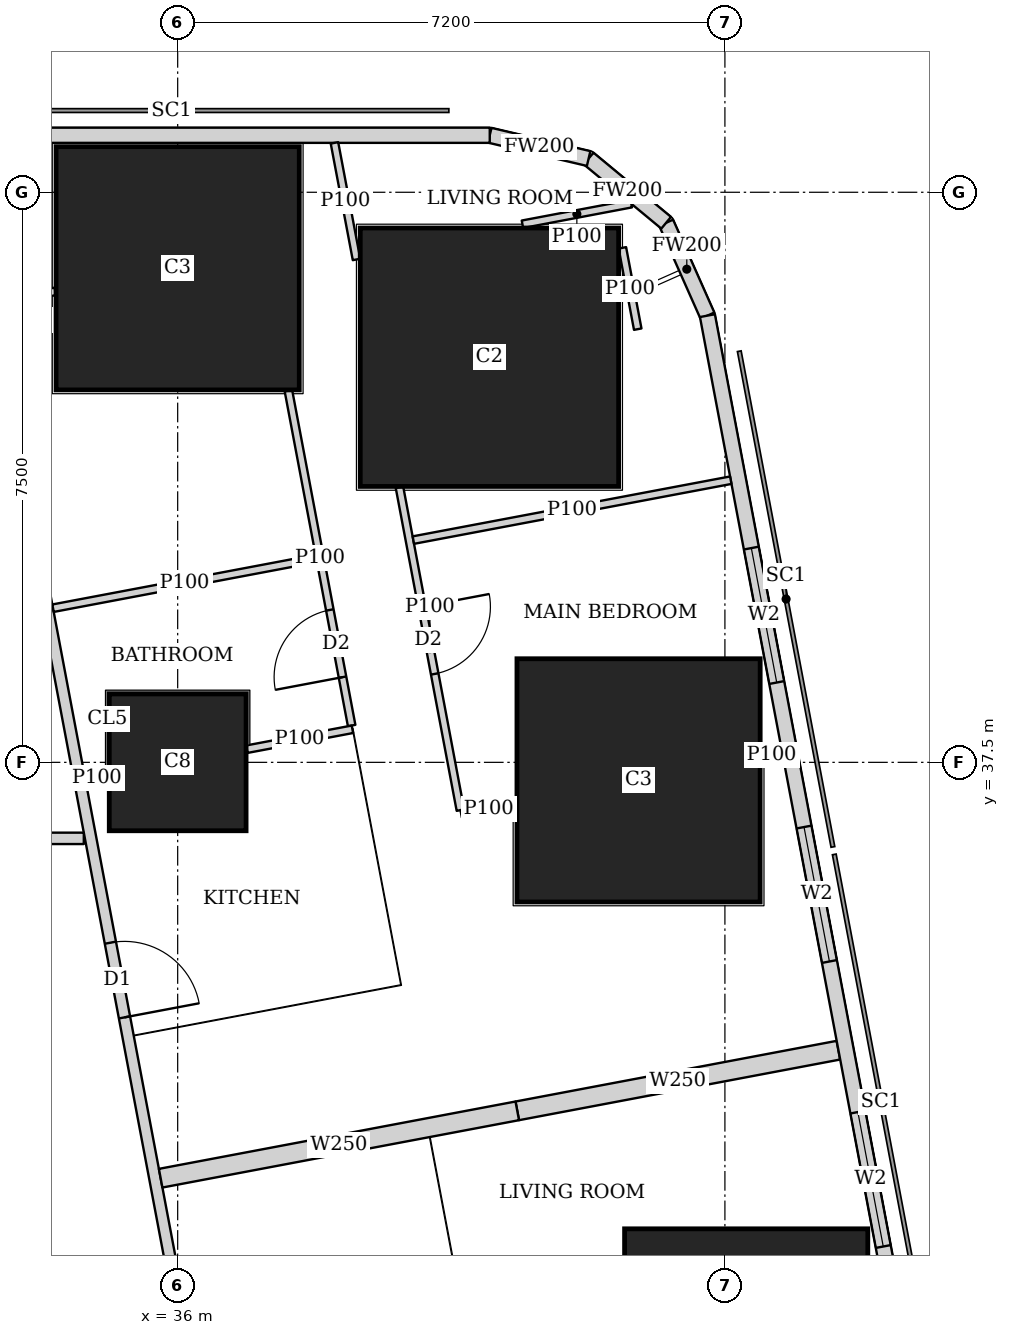
"""IFC4 building model, lengths in metres.
Left out: names, types, materials, properties, quantities, classifications, styles, units other than length and angle.
Written with IfcOpenShell. Run it as: python <this file> out.ifc"""

import sys

from ifc_helpers import new_model, si_unit, direction, frame, frame_2d, origin, origin_2d, place, context, subcontext, project, spatial, rectangle, extrude, element, fill, save


model = new_model("IFC4")
c1 = context("Model", 3, precision=1e-05, world=origin(), true_north=direction((0.0, 1.0)))
c2 = subcontext(c1, "Body", "Model", "MODEL_VIEW")
j1 = project(units=[si_unit("LENGTHUNIT", "METRE"), si_unit("PLANEANGLEUNIT", "RADIAN")], contexts=[c1])
p1 = place(None, origin())
s1 = spatial("IfcSite", under=j1, at=p1, CompositionType="ELEMENT")
p2 = place(p1, origin())
s2 = spatial("IfcBuilding", under=s1, at=p2, CompositionType="ELEMENT")
p3 = place(p2, frame((0.0, 0.0, 20.0)))
s3 = spatial("IfcBuildingStorey", under=s2, at=p3, CompositionType="ELEMENT", Elevation=20.0)
p4 = place(p3, frame((43.48, 29.763, 0.0), z_axis=(0.0, 0.0, 1.0), x_axis=(1.0, 0.0, 0.0)))
e1 = element("IfcColumn", 1, at=p4, inside=s3, PredefinedType="COLUMN", context=c2, shape_type="SweptSolid", body=[
    extrude(rectangle(XDim=3.2, YDim=3.2, at=origin_2d()), origin(), (0.0, 0.0, 1.0), 3.75),
])
p5 = place(p3, frame((36.0, 37.5, 0.0), z_axis=(0.0, 0.0, 1.0), x_axis=(1.0, 0.0, 0.0)))
e2 = element("IfcColumn", 2, at=p5, inside=s3, PredefinedType="COLUMN", context=c2, shape_type="SweptSolid", body=[
    extrude(rectangle(XDim=1.8, YDim=1.8, at=origin_2d()), origin(), (0.0, 0.0, 1.0), 3.75),
])
p6 = place(p3, frame((42.064, 37.263, -0.3), z_axis=(0.0, 0.0, 1.0), x_axis=(1.0, 0.0, 0.0)))
e3 = element("IfcColumn", 3, at=p6, inside=s3, PredefinedType="COLUMN", context=c2, shape_type="SweptSolid", body=[
    extrude(rectangle(XDim=3.2, YDim=3.2, at=origin_2d()), origin(), (0.0, 0.0, 1.0), 4.05),
])
p7 = place(p3, frame((40.102, 42.83, 0.0), z_axis=(0.0, 0.0, 1.0), x_axis=(1.0, 0.0, 0.0)))
e4 = element("IfcColumn", 4, at=p7, inside=s3, PredefinedType="COLUMN", context=c2, shape_type="SweptSolid", body=[
    extrude(rectangle(XDim=3.4, YDim=3.4, at=origin_2d()), origin(), (0.0, 0.0, 1.0), 3.75),
])
p8 = place(p3, frame((36.0, 44.0, -0.3), z_axis=(0.0, 0.0, 1.0), x_axis=(1.0, 0.0, 0.0)))
e5 = element("IfcColumn", 5, at=p8, inside=s3, PredefinedType="COLUMN", context=c2, shape_type="SweptSolid", body=[
    extrude(rectangle(XDim=3.2, YDim=3.2, at=origin_2d()), origin(), (0.0, 0.0, 1.0), 4.05),
])
p9 = place(p3, frame((50.653, 2.703, 0.0), z_axis=(0.0, 0.0, 1.0), x_axis=(-0.185612026696, 0.982623109613, 0.0)))
e6 = element("IfcWall", 6, at=p9, inside=s3, PredefinedType="SOLIDWALL", context=c2, shape_type="SweptSolid", body=[
    extrude(rectangle(XDim=41.393, YDim=0.2, at=frame_2d((20.697, 0.0))), origin(), (0.0, 0.0, 1.0), 3.5),
])
p10 = place(p9, frame((1.633, 0.0, 0.9)))
e7 = element("IfcOpeningElement", 7, at=p10, cuts=e6, PredefinedType="OPENING", context=c2, shape_type="SweptSolid", body=[
    extrude(rectangle(XDim=1.8, YDim=1.5, at=frame_2d((0.9, 0.75))), frame((0.0, 0.11, 0.0), z_axis=(0.0, -1.0, 0.0), x_axis=(1.0, 0.0, 0.0)), (0.0, 0.0, 1.0), 0.22),
])
p11 = place(p9, frame((6.032, 0.0, 0.9)))
e8 = element("IfcOpeningElement", 8, at=p11, cuts=e6, PredefinedType="OPENING", context=c2, shape_type="SweptSolid", body=[
    extrude(rectangle(XDim=1.8, YDim=1.5, at=frame_2d((0.9, 0.75))), frame((0.0, 0.11, 0.0), z_axis=(0.0, -1.0, 0.0), x_axis=(1.0, 0.0, 0.0)), (0.0, 0.0, 1.0), 0.22),
])
p12 = place(p9, frame((9.848, 0.0, 0.9)))
e9 = element("IfcOpeningElement", 9, at=p12, cuts=e6, PredefinedType="OPENING", context=c2, shape_type="SweptSolid", body=[
    extrude(rectangle(XDim=1.8, YDim=1.5, at=frame_2d((0.9, 0.75))), frame((0.0, 0.11, 0.0), z_axis=(0.0, -1.0, 0.0), x_axis=(1.0, 0.0, 0.0)), (0.0, 0.0, 1.0), 0.22),
])
p13 = place(p9, frame((17.481, 0.0, 0.9)))
e10 = element("IfcOpeningElement", 10, at=p13, cuts=e6, PredefinedType="OPENING", context=c2, shape_type="SweptSolid", body=[
    extrude(rectangle(XDim=1.8, YDim=1.5, at=frame_2d((0.9, 0.75))), frame((0.0, 0.11, 0.0), z_axis=(0.0, -1.0, 0.0), x_axis=(1.0, 0.0, 0.0)), (0.0, 0.0, 1.0), 0.22),
])
p14 = place(p9, frame((21.297, 0.0, 0.9)))
e11 = element("IfcOpeningElement", 11, at=p14, cuts=e6, PredefinedType="OPENING", context=c2, shape_type="SweptSolid", body=[
    extrude(rectangle(XDim=1.8, YDim=1.5, at=frame_2d((0.9, 0.75))), frame((0.0, 0.11, 0.0), z_axis=(0.0, -1.0, 0.0), x_axis=(1.0, 0.0, 0.0)), (0.0, 0.0, 1.0), 0.22),
])
p15 = place(p9, frame((25.113, 0.0, 0.9)))
e12 = element("IfcOpeningElement", 12, at=p15, cuts=e6, PredefinedType="OPENING", context=c2, shape_type="SweptSolid", body=[
    extrude(rectangle(XDim=1.8, YDim=1.5, at=frame_2d((0.9, 0.75))), frame((0.0, 0.11, 0.0), z_axis=(0.0, -1.0, 0.0), x_axis=(1.0, 0.0, 0.0)), (0.0, 0.0, 1.0), 0.22),
])
p16 = place(p9, frame((28.93, 0.0, 0.9)))
e13 = element("IfcOpeningElement", 13, at=p16, cuts=e6, PredefinedType="OPENING", context=c2, shape_type="SweptSolid", body=[
    extrude(rectangle(XDim=1.8, YDim=1.5, at=frame_2d((0.9, 0.75))), frame((0.0, 0.11, 0.0), z_axis=(0.0, -1.0, 0.0), x_axis=(1.0, 0.0, 0.0)), (0.0, 0.0, 1.0), 0.22),
])
p17 = place(p9, frame((32.746, 0.0, 0.9)))
e14 = element("IfcOpeningElement", 14, at=p17, cuts=e6, PredefinedType="OPENING", context=c2, shape_type="SweptSolid", body=[
    extrude(rectangle(XDim=1.8, YDim=1.5, at=frame_2d((0.9, 0.75))), frame((0.0, 0.11, 0.0), z_axis=(0.0, -1.0, 0.0), x_axis=(1.0, 0.0, 0.0)), (0.0, 0.0, 1.0), 0.22),
])
p18 = place(p9, frame((36.481, 0.0, 0.9)))
e15 = element("IfcOpeningElement", 15, at=p18, cuts=e6, PredefinedType="OPENING", context=c2, shape_type="SweptSolid", body=[
    extrude(rectangle(XDim=1.8, YDim=1.5, at=frame_2d((0.9, 0.75))), frame((0.0, 0.11, 0.0), z_axis=(0.0, -1.0, 0.0), x_axis=(1.0, 0.0, 0.0)), (0.0, 0.0, 1.0), 0.22),
])
p19 = place(p3, frame((42.97, 43.377, 0.0), z_axis=(0.0, 0.0, 1.0), x_axis=(-0.406002956633, 0.913871762998, 0.0)))
e16 = element("IfcWall", 16, at=p19, inside=s3, PredefinedType="SOLIDWALL", context=c2, shape_type="SweptSolid", body=[
    extrude(rectangle(XDim=1.337, YDim=0.2, at=frame_2d((0.669, 0.0))), origin(), (0.0, 0.0, 1.0), 3.5),
])
p20 = place(p3, frame((42.427, 44.599, 0.0), z_axis=(0.0, 0.0, 1.0), x_axis=(-0.770091412544, 0.637933551655, 0.0)))
e17 = element("IfcWall", 17, at=p20, inside=s3, PredefinedType="SOLIDWALL", context=c2, shape_type="SweptSolid", body=[
    extrude(rectangle(XDim=1.324, YDim=0.2, at=frame_2d((0.662, 0.0))), origin(), (0.0, 0.0, 1.0), 3.5),
])
p21 = place(p3, frame((41.407, 45.444, 0.0), z_axis=(0.0, 0.0, 1.0), x_axis=(-0.973453091607, 0.228886606077, 0.0)))
e18 = element("IfcWall", 18, at=p21, inside=s3, PredefinedType="SOLIDWALL", context=c2, shape_type="SweptSolid", body=[
    extrude(rectangle(XDim=1.336, YDim=0.2, at=frame_2d((0.668, 0.0))), origin(), (0.0, 0.0, 1.0), 3.5),
])
p22 = place(p3, frame((40.106, 45.75, 0.0), z_axis=(0.0, 0.0, 1.0), x_axis=(-1.0, 0.0, 0.0)))
e19 = element("IfcWall", 19, at=p22, inside=s3, PredefinedType="SOLIDWALL", context=c2, shape_type="SweptSolid", body=[
    extrude(rectangle(XDim=37.943, YDim=0.2, at=frame_2d((18.971, 0.0))), origin(), (0.0, 0.0, 1.0), 3.5),
])
p23 = place(p22, frame((8.606, 0.0, 0.9)))
e20 = element("IfcOpeningElement", 20, at=p23, cuts=e19, PredefinedType="OPENING", context=c2, shape_type="SweptSolid", body=[
    extrude(rectangle(XDim=1.8, YDim=1.5, at=frame_2d((0.9, 0.75))), frame((0.0, 0.11, 0.0), z_axis=(0.0, -1.0, 0.0), x_axis=(1.0, 0.0, 0.0)), (0.0, 0.0, 1.0), 0.22),
])
p24 = place(p22, frame((12.206, 0.0, 0.9)))
e21 = element("IfcOpeningElement", 21, at=p24, cuts=e19, PredefinedType="OPENING", context=c2, shape_type="SweptSolid", body=[
    extrude(rectangle(XDim=1.8, YDim=1.5, at=frame_2d((0.9, 0.75))), frame((0.0, 0.11, 0.0), z_axis=(0.0, -1.0, 0.0), x_axis=(1.0, 0.0, 0.0)), (0.0, 0.0, 1.0), 0.22),
])
p25 = place(p22, frame((15.806, 0.0, 0.9)))
e22 = element("IfcOpeningElement", 22, at=p25, cuts=e19, PredefinedType="OPENING", context=c2, shape_type="SweptSolid", body=[
    extrude(rectangle(XDim=1.8, YDim=1.5, at=frame_2d((0.9, 0.75))), frame((0.0, 0.11, 0.0), z_axis=(0.0, -1.0, 0.0), x_axis=(1.0, 0.0, 0.0)), (0.0, 0.0, 1.0), 0.22),
])
p26 = place(p22, frame((19.406, 0.0, 0.9)))
e23 = element("IfcOpeningElement", 23, at=p26, cuts=e19, PredefinedType="OPENING", context=c2, shape_type="SweptSolid", body=[
    extrude(rectangle(XDim=1.8, YDim=1.5, at=frame_2d((0.9, 0.75))), frame((0.0, 0.11, 0.0), z_axis=(0.0, -1.0, 0.0), x_axis=(1.0, 0.0, 0.0)), (0.0, 0.0, 1.0), 0.22),
])
p27 = place(p22, frame((23.006, 0.0, 0.9)))
e24 = element("IfcOpeningElement", 24, at=p27, cuts=e19, PredefinedType="OPENING", context=c2, shape_type="SweptSolid", body=[
    extrude(rectangle(XDim=1.8, YDim=1.5, at=frame_2d((0.9, 0.75))), frame((0.0, 0.11, 0.0), z_axis=(0.0, -1.0, 0.0), x_axis=(1.0, 0.0, 0.0)), (0.0, 0.0, 1.0), 0.22),
])
p28 = place(p22, frame((26.606, 0.0, 0.9)))
e25 = element("IfcOpeningElement", 25, at=p28, cuts=e19, PredefinedType="OPENING", context=c2, shape_type="SweptSolid", body=[
    extrude(rectangle(XDim=1.8, YDim=1.5, at=frame_2d((0.9, 0.75))), frame((0.0, 0.11, 0.0), z_axis=(0.0, -1.0, 0.0), x_axis=(1.0, 0.0, 0.0)), (0.0, 0.0, 1.0), 0.22),
])
p29 = place(p3, frame((8.35, 36.5, 0.0), z_axis=(0.0, 0.0, 1.0), x_axis=(1.0, 0.0, 0.0)))
e26 = element("IfcWall", 26, at=p29, inside=s3, PredefinedType="SOLIDWALL", context=c2, shape_type="SweptSolid", body=[
    extrude(rectangle(XDim=26.415, YDim=0.15, at=frame_2d((13.208, 0.0))), origin(), (0.0, 0.0, 1.0), 3.5),
])
p30 = place(p29, frame((3.383, 0.0, 0.0)))
e27 = element("IfcOpeningElement", 27, at=p30, cuts=e26, PredefinedType="OPENING", context=c2, shape_type="SweptSolid", body=[
    extrude(rectangle(XDim=1.0, YDim=2.1, at=frame_2d((0.5, 1.05))), frame((0.0, 0.085, 0.0), z_axis=(0.0, -1.0, 0.0), x_axis=(1.0, 0.0, 0.0)), (0.0, 0.0, 1.0), 0.17),
])
p31 = place(p29, frame((7.65, 0.0, 0.0)))
e28 = element("IfcOpeningElement", 28, at=p31, cuts=e26, PredefinedType="OPENING", context=c2, shape_type="SweptSolid", body=[
    extrude(rectangle(XDim=1.0, YDim=2.1, at=frame_2d((0.5, 1.05))), frame((0.0, 0.085, 0.0), z_axis=(0.0, -1.0, 0.0), x_axis=(1.0, 0.0, 0.0)), (0.0, 0.0, 1.0), 0.17),
])
p32 = place(p29, frame((14.857, 0.0, 0.0)))
e29 = element("IfcOpeningElement", 29, at=p32, cuts=e26, PredefinedType="OPENING", context=c2, shape_type="SweptSolid", body=[
    extrude(rectangle(XDim=1.0, YDim=2.1, at=frame_2d((0.5, 1.05))), frame((0.0, 0.085, 0.0), z_axis=(0.0, -1.0, 0.0), x_axis=(1.0, 0.0, 0.0)), (0.0, 0.0, 1.0), 0.17),
])
p33 = place(p3, frame((33.755, 42.325, 0.0), z_axis=(0.0, 0.0, 1.0), x_axis=(0.185611461091, -0.982623216453, 0.0)))
e30 = element("IfcWall", 30, at=p33, inside=s3, PredefinedType="SOLIDWALL", context=c2, shape_type="SweptSolid", body=[
    extrude(rectangle(XDim=40.241, YDim=0.15, at=frame_2d((20.121, 0.0))), origin(), (0.0, 0.0, 1.0), 2.5),
])
p34 = place(p33, frame((7.325, 0.0, 0.0)))
e31 = element("IfcOpeningElement", 31, at=p34, cuts=e30, PredefinedType="OPENING", context=c2, shape_type="SweptSolid", body=[
    extrude(rectangle(XDim=1.0, YDim=2.1, at=frame_2d((0.5, 1.05))), frame((0.0, 0.085, 0.0), z_axis=(0.0, -1.0, 0.0), x_axis=(1.0, 0.0, 0.0)), (0.0, 0.0, 1.0), 0.17),
])
p35 = place(p33, frame((11.902, 0.0, 0.0)))
e32 = element("IfcOpeningElement", 32, at=p35, cuts=e30, PredefinedType="OPENING", context=c2, shape_type="SweptSolid", body=[
    extrude(rectangle(XDim=1.0, YDim=2.1, at=frame_2d((0.5, 1.05))), frame((0.0, 0.085, 0.0), z_axis=(0.0, -1.0, 0.0), x_axis=(1.0, 0.0, 0.0)), (0.0, 0.0, 1.0), 0.17),
])
p36 = place(p33, frame((25.718, 0.0, 0.0)))
e33 = element("IfcOpeningElement", 33, at=p36, cuts=e30, PredefinedType="OPENING", context=c2, shape_type="SweptSolid", body=[
    extrude(rectangle(XDim=1.0, YDim=2.1, at=frame_2d((0.5, 1.05))), frame((0.0, 0.085, 0.0), z_axis=(0.0, -1.0, 0.0), x_axis=(1.0, 0.0, 0.0)), (0.0, 0.0, 1.0), 0.17),
])
p37 = place(p33, frame((31.788, 0.0, 0.0)))
e34 = element("IfcOpeningElement", 34, at=p37, cuts=e30, PredefinedType="OPENING", context=c2, shape_type="SweptSolid", body=[
    extrude(rectangle(XDim=1.0, YDim=2.1, at=frame_2d((0.5, 1.05))), frame((0.0, 0.085, 0.0), z_axis=(0.0, -1.0, 0.0), x_axis=(1.0, 0.0, 0.0)), (0.0, 0.0, 1.0), 0.17),
])
p38 = place(p3, frame((41.851, 44.269, 0.0), z_axis=(0.0, 0.0, 1.0), x_axis=(0.185411943936, -0.982660883034, 0.0)))
e35 = element("IfcWall", 35, at=p38, inside=s3, PredefinedType="PARTITIONING", context=c2, shape_type="SweptSolid", body=[
    extrude(rectangle(XDim=1.089, YDim=0.1, at=frame_2d((0.544, 0.0))), origin(), (0.0, 0.0, 1.0), 3.5),
])
p39 = place(p3, frame((38.063, 45.65, 0.0), z_axis=(0.0, 0.0, 1.0), x_axis=(0.185789650565, -0.982589540827, 0.0)))
e36 = element("IfcWall", 36, at=p39, inside=s3, PredefinedType="PARTITIONING", context=c2, shape_type="SweptSolid", body=[
    extrude(rectangle(XDim=1.561, YDim=0.1, at=frame_2d((0.781, 0.0))), origin(), (0.0, 0.0, 1.0), 3.5),
])
p40 = place(p3, frame((38.918, 41.12, 0.0), z_axis=(0.0, 0.0, 1.0), x_axis=(0.185474723155, -0.982649035552, 0.0)))
e37 = element("IfcWall", 37, at=p40, inside=s3, PredefinedType="PARTITIONING", context=c2, shape_type="SweptSolid", body=[
    extrude(rectangle(XDim=4.324, YDim=0.1, at=frame_2d((2.162, 0.0))), origin(), (0.0, 0.0, 1.0), 3.5),
])
p41 = place(p40, frame((1.6, 0.0, 0.0)))
e38 = element("IfcOpeningElement", 38, at=p41, cuts=e37, PredefinedType="OPENING", context=c2, shape_type="SweptSolid", body=[
    extrude(rectangle(XDim=0.9, YDim=2.1, at=frame_2d((0.45, 1.05))), frame((0.0, 0.06, 0.0), z_axis=(0.0, -1.0, 0.0), x_axis=(1.0, 0.0, 0.0)), (0.0, 0.0, 1.0), 0.12),
])
p42 = place(p3, frame((37.457, 42.39, 0.0), z_axis=(0.0, 0.0, 1.0), x_axis=(0.185560627322, -0.982632817276, 0.0)))
e39 = element("IfcWall", 39, at=p42, inside=s3, PredefinedType="PARTITIONING", context=c2, shape_type="SweptSolid", body=[
    extrude(rectangle(XDim=4.484, YDim=0.1, at=frame_2d((2.242, 0.0))), origin(), (0.0, 0.0, 1.0), 3.5),
])
p43 = place(p42, frame((2.936, 0.0, 0.0)))
e40 = element("IfcOpeningElement", 40, at=p43, cuts=e39, PredefinedType="OPENING", context=c2, shape_type="SweptSolid", body=[
    extrude(rectangle(XDim=0.9, YDim=2.1, at=frame_2d((0.45, 1.05))), frame((0.0, 0.06, 0.0), z_axis=(0.0, -1.0, 0.0), x_axis=(1.0, 0.0, 0.0)), (0.0, 0.0, 1.0), 0.12),
])
p44 = place(p3, frame((41.968, 44.85, 0.0), z_axis=(0.0, 0.0, 1.0), x_axis=(-0.982563630066, -0.185926633033, 0.0)))
e41 = element("IfcWall", 41, at=p44, inside=s3, PredefinedType="PARTITIONING", context=c2, shape_type="SweptSolid", body=[
    extrude(rectangle(XDim=1.458, YDim=0.1, at=frame_2d((0.729, 0.0))), origin(), (0.0, 0.0, 1.0), 3.5),
])
p45 = place(p3, frame((43.277, 41.212, 0.0), z_axis=(0.0, 0.0, 1.0), x_axis=(-0.982665405803, -0.185387972203, 0.0)))
e42 = element("IfcWall", 42, at=p45, inside=s3, PredefinedType="PARTITIONING", context=c2, shape_type="SweptSolid", body=[
    extrude(rectangle(XDim=4.25, YDim=0.1, at=frame_2d((2.125, 0.0))), origin(), (0.0, 0.0, 1.0), 2.1),
])
p46 = place(p3, frame((43.955, 37.62, 0.0), z_axis=(0.0, 0.0, 1.0), x_axis=(-0.982532299353, -0.186092129678, 0.0)))
e43 = element("IfcWall", 43, at=p46, inside=s3, PredefinedType="PARTITIONING", context=c2, shape_type="SweptSolid", body=[
    extrude(rectangle(XDim=0.286, YDim=0.1, at=frame_2d((0.143, 0.0))), origin(), (0.0, 0.0, 1.0), 3.5),
])
p47 = place(p3, frame((40.454, 36.959, 0.0), z_axis=(0.0, 0.0, 1.0), x_axis=(-0.982578421631, -0.185848447247, 0.0)))
e44 = element("IfcWall", 44, at=p47, inside=s3, PredefinedType="PARTITIONING", context=c2, shape_type="SweptSolid", body=[
    extrude(rectangle(XDim=0.737, YDim=0.1, at=frame_2d((0.369, 0.0))), origin(), (0.0, 0.0, 1.0), 3.5),
])
p48 = place(p3, frame((34.39, 43.696, 0.0), z_axis=(0.0, 0.0, 1.0), x_axis=(-0.982640737979, -0.185518678479, 0.0)))
e45 = element("IfcWall", 45, at=p48, inside=s3, PredefinedType="PARTITIONING", context=c2, shape_type="SweptSolid", body=[
    extrude(rectangle(XDim=0.803, YDim=0.1, at=frame_2d((0.401, 0.0))), origin(), (0.0, 0.0, 1.0), 2.05),
])
p49 = place(p3, frame((37.823, 40.182, 0.0), z_axis=(0.0, 0.0, 1.0), x_axis=(-0.98263926043, -0.185526504472, 0.0)))
e46 = element("IfcWall", 46, at=p49, inside=s3, PredefinedType="PARTITIONING", context=c2, shape_type="SweptSolid", body=[
    extrude(rectangle(XDim=3.524, YDim=0.1, at=frame_2d((1.762, 0.0))), origin(), (0.0, 0.0, 1.0), 3.5),
])
p50 = place(p3, frame((38.299, 37.935, 0.0), z_axis=(0.0, 0.0, 1.0), x_axis=(-0.982680053146, -0.185310315822, 0.0)))
e47 = element("IfcWall", 47, at=p50, inside=s3, PredefinedType="PARTITIONING", context=c2, shape_type="SweptSolid", body=[
    extrude(rectangle(XDim=1.414, YDim=0.1, at=frame_2d((0.707, 0.0))), origin(), (0.0, 0.0, 1.0), 3.5),
])
p51 = place(p3, frame((35.09, 37.328, 0.0), z_axis=(0.0, 0.0, 1.0), x_axis=(-0.982961380226, -0.183812200315, 0.0)))
e48 = element("IfcWall", 48, at=p51, inside=s3, PredefinedType="PARTITIONING", context=c2, shape_type="SweptSolid", body=[
    extrude(rectangle(XDim=0.31, YDim=0.1, at=frame_2d((0.155, 0.0))), origin(), (0.0, 0.0, 1.0), 3.5),
])
p52 = place(p3, frame((44.693, 33.713, 0.0), z_axis=(0.0, 0.0, 1.0), x_axis=(-0.982633535512, -0.185556823879, 0.0)))
e49 = element("IfcWall", 49, at=p52, inside=s3, PredefinedType="SOLIDWALL", context=c2, shape_type="SweptSolid", body=[
    extrude(rectangle(XDim=4.3, YDim=0.25, at=frame_2d((2.15, 0.0))), origin(), (0.0, 0.0, 1.0), 2.05),
])
p53 = place(p3, frame((40.468, 32.915, 0.0), z_axis=(0.0, 0.0, 1.0), x_axis=(-0.982635807605, -0.185544791394, 0.0)))
e50 = element("IfcWall", 50, at=p53, inside=s3, PredefinedType="SOLIDWALL", context=c2, shape_type="SweptSolid", body=[
    extrude(rectangle(XDim=4.775, YDim=0.25, at=frame_2d((2.388, 0.0))), origin(), (0.0, 0.0, 1.0), 3.5),
])
p54 = place(p16, origin())
e51 = element("IfcWindow", 51, at=p54, inside=s3, PartitioningType="SINGLE_PANEL", PredefinedType="WINDOW", context=c2, shape_type="SweptSolid", body=[
    extrude(rectangle(XDim=1.8, YDim=1.5, at=frame_2d((0.9, 0.75))), frame((0.0, 0.03, 0.0), z_axis=(0.0, -1.0, 0.0), x_axis=(1.0, 0.0, 0.0)), (0.0, 0.0, 1.0), 0.06),
])
fill(e13, e51)
p55 = place(p17, origin())
e52 = element("IfcWindow", 52, at=p55, inside=s3, PartitioningType="SINGLE_PANEL", PredefinedType="WINDOW", context=c2, shape_type="SweptSolid", body=[
    extrude(rectangle(XDim=1.8, YDim=1.5, at=frame_2d((0.9, 0.75))), frame((0.0, 0.03, 0.0), z_axis=(0.0, -1.0, 0.0), x_axis=(1.0, 0.0, 0.0)), (0.0, 0.0, 1.0), 0.06),
])
fill(e14, e52)
p56 = place(p18, origin())
e53 = element("IfcWindow", 53, at=p56, inside=s3, PartitioningType="SINGLE_PANEL", PredefinedType="WINDOW", context=c2, shape_type="SweptSolid", body=[
    extrude(rectangle(XDim=1.8, YDim=1.5, at=frame_2d((0.9, 0.75))), frame((0.0, 0.03, 0.0), z_axis=(0.0, -1.0, 0.0), x_axis=(1.0, 0.0, 0.0)), (0.0, 0.0, 1.0), 0.06),
])
fill(e15, e53)
p57 = place(p41, origin())
e54 = element("IfcDoor", 54, at=p57, inside=s3, OperationType="SINGLE_SWING_LEFT", PredefinedType="DOOR", context=c2, shape_type="SweptSolid", body=[
    extrude(rectangle(XDim=0.9, YDim=2.1, at=frame_2d((0.45, 1.05))), frame((0.0, 0.025, 0.0), z_axis=(0.0, -1.0, 0.0), x_axis=(1.0, 0.0, 0.0)), (0.0, 0.0, 1.0), 0.05),
])
fill(e38, e54)
p58 = place(p43, origin())
e55 = element("IfcDoor", 55, at=p58, inside=s3, OperationType="SINGLE_SWING_LEFT", PredefinedType="DOOR", context=c2, shape_type="SweptSolid", body=[
    extrude(rectangle(XDim=0.9, YDim=2.1, at=frame_2d((0.45, 1.05))), frame((0.0, 0.025, 0.0), z_axis=(0.0, -1.0, 0.0), x_axis=(1.0, 0.0, 0.0)), (0.0, 0.0, 1.0), 0.05),
])
fill(e40, e55)
p59 = place(p34, origin())
e56 = element("IfcDoor", 56, at=p59, inside=s3, OperationType="SINGLE_SWING_RIGHT", PredefinedType="DOOR", context=c2, shape_type="SweptSolid", body=[
    extrude(rectangle(XDim=1.0, YDim=2.1, at=frame_2d((0.5, 1.05))), frame((0.0, 0.025, 0.0), z_axis=(0.0, -1.0, 0.0), x_axis=(1.0, 0.0, 0.0)), (0.0, 0.0, 1.0), 0.05),
])
fill(e31, e56)
save(model, sys.argv[1])
